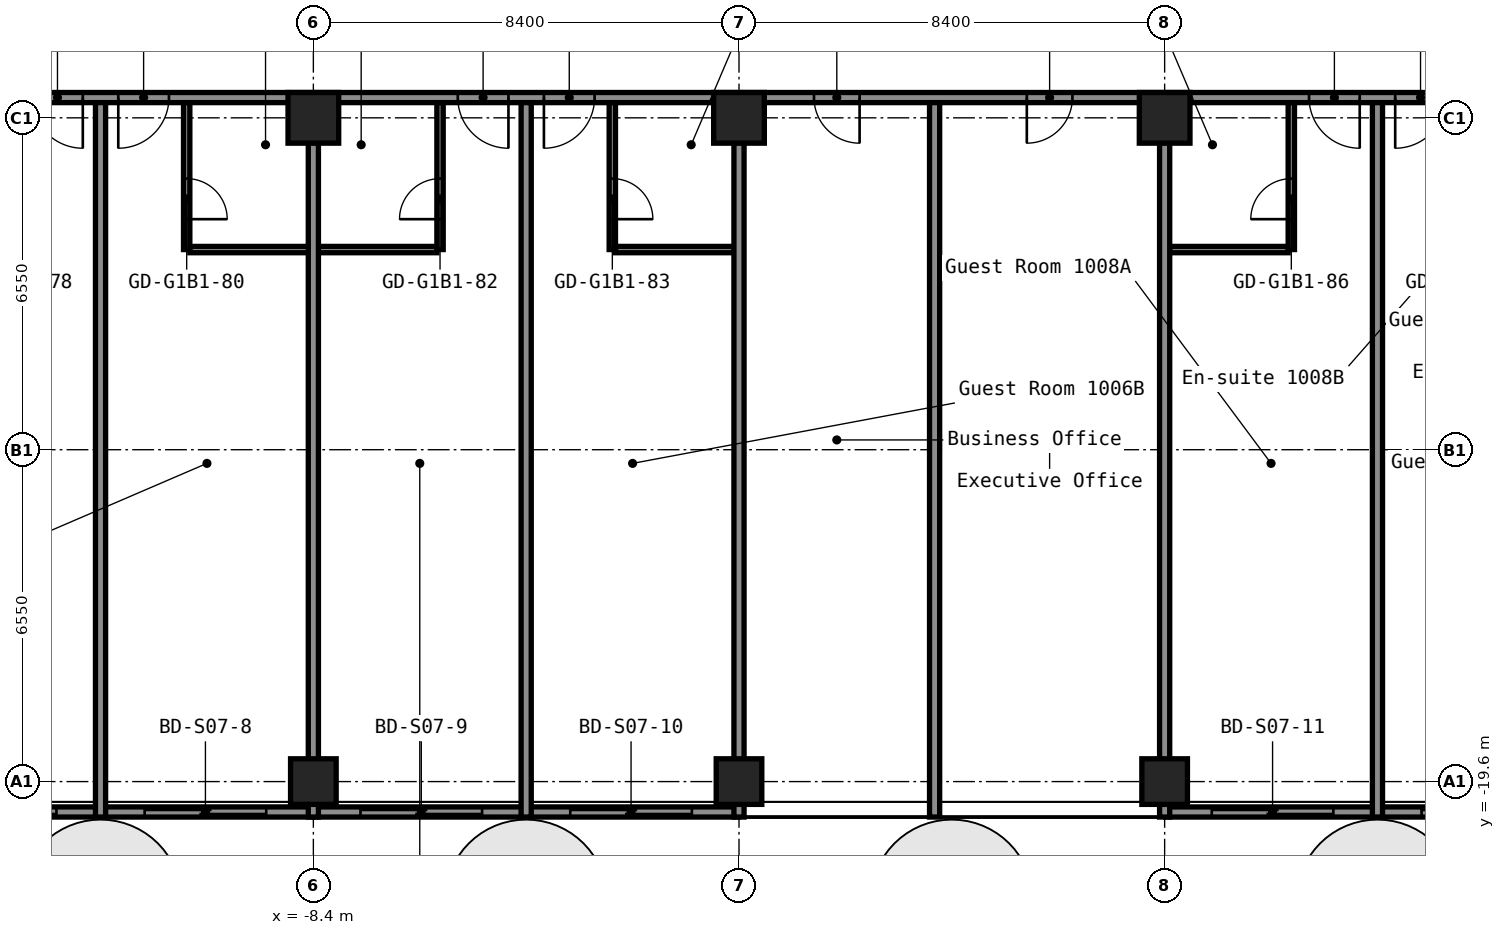
"""IFC4 building model, lengths in metres.
Left out: names, types, materials, properties, quantities, classifications, styles, units other than length and angle.
Written with IfcOpenShell. Run it as: python <this file> out.ifc"""

import sys

from ifc_helpers import new_model, si_unit, direction, frame, frame_2d, origin, origin_2d, place, context, subcontext, project, spatial, rectangle, hollow_rectangle, extrude, element, fill, save


model = new_model("IFC4")
c1 = context("Model", 3, precision=1e-05, world=origin(), true_north=direction((0.0, 1.0)))
c2 = subcontext(c1, "Body", "Model", "MODEL_VIEW")
j1 = project(units=[si_unit("LENGTHUNIT", "METRE"), si_unit("PLANEANGLEUNIT", "RADIAN")], contexts=[c1])
p1 = place(None, origin())
s1 = spatial("IfcSite", under=j1, at=p1, CompositionType="ELEMENT")
p2 = place(p1, origin())
s2 = spatial("IfcBuilding", under=s1, at=p2, CompositionType="ELEMENT")
p3 = place(p2, frame((0.0, 0.0, 39.0)))
s3 = spatial("IfcBuildingStorey", under=s2, at=p3, CompositionType="ELEMENT", Elevation=39.0)
p4 = place(p3, frame((-8.4, -19.6, 0.0), z_axis=(0.0, 0.0, 1.0), x_axis=(1.0, 0.0, 0.0)))
e1 = element("IfcColumn", 1, at=p4, inside=s3, PredefinedType="COLUMN", context=c2, shape_type="SweptSolid", body=[
    extrude(hollow_rectangle(XDim=0.9, YDim=0.9, WallThickness=0.036, at=origin_2d()), origin(), (0.0, 0.0, 1.0), 2.8),
])
p5 = place(p3, frame((-8.4, -6.5, 0.0), z_axis=(0.0, 0.0, 1.0), x_axis=(1.0, 0.0, 0.0)))
e2 = element("IfcColumn", 2, at=p5, inside=s3, PredefinedType="COLUMN", context=c2, shape_type="SweptSolid", body=[
    extrude(hollow_rectangle(XDim=1.0, YDim=1.0, WallThickness=0.04, at=origin_2d()), origin(), (0.0, 0.0, 1.0), 2.8),
])
p6 = place(p3, frame((0.0, -19.6, 0.0), z_axis=(0.0, 0.0, 1.0), x_axis=(1.0, 0.0, 0.0)))
e3 = element("IfcColumn", 3, at=p6, inside=s3, PredefinedType="COLUMN", context=c2, shape_type="SweptSolid", body=[
    extrude(hollow_rectangle(XDim=0.9, YDim=0.9, WallThickness=0.036, at=origin_2d()), origin(), (0.0, 0.0, 1.0), 2.8),
])
p7 = place(p3, frame((0.0, -6.5, 0.0), z_axis=(0.0, 0.0, 1.0), x_axis=(1.0, 0.0, 0.0)))
e4 = element("IfcColumn", 4, at=p7, inside=s3, PredefinedType="COLUMN", context=c2, shape_type="SweptSolid", body=[
    extrude(hollow_rectangle(XDim=1.0, YDim=1.0, WallThickness=0.04, at=origin_2d()), origin(), (0.0, 0.0, 1.0), 2.8),
])
p8 = place(p3, frame((8.4, -19.6, 0.0), z_axis=(0.0, 0.0, 1.0), x_axis=(1.0, 0.0, 0.0)))
e5 = element("IfcColumn", 5, at=p8, inside=s3, PredefinedType="COLUMN", context=c2, shape_type="SweptSolid", body=[
    extrude(hollow_rectangle(XDim=0.9, YDim=0.9, WallThickness=0.036, at=origin_2d()), origin(), (0.0, 0.0, 1.0), 2.8),
])
p9 = place(p3, frame((8.4, -6.5, 0.0), z_axis=(0.0, 0.0, 1.0), x_axis=(1.0, 0.0, 0.0)))
e6 = element("IfcColumn", 6, at=p9, inside=s3, PredefinedType="COLUMN", context=c2, shape_type="SweptSolid", body=[
    extrude(hollow_rectangle(XDim=1.0, YDim=1.0, WallThickness=0.04, at=origin_2d()), origin(), (0.0, 0.0, 1.0), 2.8),
])
p10 = place(p3, frame((-10.837, -9.1, 0.0), z_axis=(0.0, 0.0, 1.0), x_axis=(1.0, 0.0, 0.0)))
e7 = element("IfcWall", 7, at=p10, inside=s3, PredefinedType="PARTITIONING", context=c2, shape_type="SweptSolid", body=[
    extrude(rectangle(XDim=4.875, YDim=0.125, at=frame_2d((2.438, 0.0))), origin(), (0.0, 0.0, 1.0), 2.8),
])
for number, where, z_axis, x_axis in (
    (8, (-2.438, -9.1, 0.0), (0.0, 0.0, 1.0), (1.0, 0.0, 0.0)),
    (9, (8.5, -9.1, 0.0), (0.0, 0.0, 1.0), (1.0, 0.0, 0.0)),
):
    element("IfcWall", number, at=place(p3, frame(where, z_axis=z_axis, x_axis=x_axis)), inside=s3, PredefinedType="PARTITIONING", context=c2, shape_type="SweptSolid", body=[
        extrude(rectangle(XDim=2.337, YDim=0.125, at=frame_2d((1.169, 0.0))), origin(), (0.0, 0.0, 1.0), 2.8),
    ])
p11 = place(p3, frame((-16.8, -6.1, 0.0), z_axis=(0.0, 0.0, 1.0), x_axis=(1.0, 0.0, 0.0)))
e10 = element("IfcWall", 10, at=p11, inside=s3, PredefinedType="PARTITIONING", context=c2, shape_type="SweptSolid", body=[
    extrude(rectangle(XDim=33.6, YDim=0.2, at=frame_2d((16.8, 0.0))), origin(), (0.0, 0.0, 1.0), 2.8),
])
p12 = place(p11, frame((2.85, 0.0, 0.0)))
e11 = element("IfcOpeningElement", 11, at=p12, cuts=e10, PredefinedType="OPENING", context=c2, shape_type="SweptSolid", body=[
    extrude(rectangle(XDim=1.0, YDim=2.1, at=frame_2d((0.5, 1.05))), frame((0.0, 0.11, 0.0), z_axis=(0.0, -1.0, 0.0), x_axis=(1.0, 0.0, 0.0)), (0.0, 0.0, 1.0), 0.22),
])
p13 = place(p11, frame((4.55, 0.0, 0.0)))
e12 = element("IfcOpeningElement", 12, at=p13, cuts=e10, PredefinedType="OPENING", context=c2, shape_type="SweptSolid", body=[
    extrude(rectangle(XDim=1.0, YDim=2.1, at=frame_2d((0.5, 1.05))), frame((0.0, 0.11, 0.0), z_axis=(0.0, -1.0, 0.0), x_axis=(1.0, 0.0, 0.0)), (0.0, 0.0, 1.0), 0.22),
])
p14 = place(p11, frame((11.25, 0.0, 0.0)))
e13 = element("IfcOpeningElement", 13, at=p14, cuts=e10, PredefinedType="OPENING", context=c2, shape_type="SweptSolid", body=[
    extrude(rectangle(XDim=1.0, YDim=2.1, at=frame_2d((0.5, 1.05))), frame((0.0, 0.11, 0.0), z_axis=(0.0, -1.0, 0.0), x_axis=(1.0, 0.0, 0.0)), (0.0, 0.0, 1.0), 0.22),
])
p15 = place(p11, frame((12.95, 0.0, 0.0)))
e14 = element("IfcOpeningElement", 14, at=p15, cuts=e10, PredefinedType="OPENING", context=c2, shape_type="SweptSolid", body=[
    extrude(rectangle(XDim=1.0, YDim=2.1, at=frame_2d((0.5, 1.05))), frame((0.0, 0.11, 0.0), z_axis=(0.0, -1.0, 0.0), x_axis=(1.0, 0.0, 0.0)), (0.0, 0.0, 1.0), 0.22),
])
p16 = place(p11, frame((18.28, 0.0, 0.0)))
e15 = element("IfcOpeningElement", 15, at=p16, cuts=e10, PredefinedType="OPENING", context=c2, shape_type="SweptSolid", body=[
    extrude(rectangle(XDim=0.9, YDim=2.1, at=frame_2d((0.45, 1.05))), frame((0.0, 0.11, 0.0), z_axis=(0.0, -1.0, 0.0), x_axis=(1.0, 0.0, 0.0)), (0.0, 0.0, 1.0), 0.22),
])
p17 = place(p11, frame((22.48, 0.0, 0.0)))
e16 = element("IfcOpeningElement", 16, at=p17, cuts=e10, PredefinedType="OPENING", context=c2, shape_type="SweptSolid", body=[
    extrude(rectangle(XDim=0.9, YDim=2.1, at=frame_2d((0.45, 1.05))), frame((0.0, 0.11, 0.0), z_axis=(0.0, -1.0, 0.0), x_axis=(1.0, 0.0, 0.0)), (0.0, 0.0, 1.0), 0.22),
])
p18 = place(p11, frame((28.05, 0.0, 0.0)))
e17 = element("IfcOpeningElement", 17, at=p18, cuts=e10, PredefinedType="OPENING", context=c2, shape_type="SweptSolid", body=[
    extrude(rectangle(XDim=1.0, YDim=2.1, at=frame_2d((0.5, 1.05))), frame((0.0, 0.11, 0.0), z_axis=(0.0, -1.0, 0.0), x_axis=(1.0, 0.0, 0.0)), (0.0, 0.0, 1.0), 0.22),
])
p19 = place(p11, frame((29.75, 0.0, 0.0)))
e18 = element("IfcOpeningElement", 18, at=p19, cuts=e10, PredefinedType="OPENING", context=c2, shape_type="SweptSolid", body=[
    extrude(rectangle(XDim=1.0, YDim=2.1, at=frame_2d((0.5, 1.05))), frame((0.0, 0.11, 0.0), z_axis=(0.0, -1.0, 0.0), x_axis=(1.0, 0.0, 0.0)), (0.0, 0.0, 1.0), 0.22),
])
p20 = place(p3, frame((-12.6, -20.3, 0.0), z_axis=(0.0, 0.0, 1.0), x_axis=(0.0, 1.0, 0.0)))
e19 = element("IfcWall", 19, at=p20, inside=s3, PredefinedType="PARTITIONING", context=c2, shape_type="SweptSolid", body=[
    extrude(rectangle(XDim=14.1, YDim=0.2, at=frame_2d((7.05, 0.0))), origin(), (0.0, 0.0, 1.0), 2.8),
])
p21 = place(p3, frame((-10.9, -9.1, 0.0), z_axis=(0.0, 0.0, 1.0), x_axis=(0.0, 1.0, 0.0)))
e20 = element("IfcWall", 20, at=p21, inside=s3, PredefinedType="PARTITIONING", context=c2, shape_type="SweptSolid", body=[
    extrude(rectangle(XDim=2.9, YDim=0.125, at=frame_2d((1.45, 0.0))), origin(), (0.0, 0.0, 1.0), 2.8),
])
p22 = place(p21, frame((0.6, 0.0, 0.0)))
e21 = element("IfcOpeningElement", 21, at=p22, cuts=e20, PredefinedType="OPENING", context=c2, shape_type="SweptSolid", body=[
    extrude(rectangle(XDim=0.8, YDim=2.1, at=frame_2d((0.4, 1.05))), frame((0.0, 0.073, 0.0), z_axis=(0.0, -1.0, 0.0), x_axis=(1.0, 0.0, 0.0)), (0.0, 0.0, 1.0), 0.145),
])
p23 = place(p3, frame((-8.4, -20.3, 0.0), z_axis=(0.0, 0.0, 1.0), x_axis=(0.0, 1.0, 0.0)))
e22 = element("IfcWall", 22, at=p23, inside=s3, PredefinedType="PARTITIONING", context=c2, shape_type="SweptSolid", body=[
    extrude(rectangle(XDim=13.31, YDim=0.2, at=frame_2d((6.655, 0.0))), origin(), (0.0, 0.0, 1.0), 2.8),
])
p24 = place(p3, frame((-5.9, -9.1, 0.0), z_axis=(0.0, 0.0, 1.0), x_axis=(0.0, 1.0, 0.0)))
e23 = element("IfcWall", 23, at=p24, inside=s3, PredefinedType="PARTITIONING", context=c2, shape_type="SweptSolid", body=[
    extrude(rectangle(XDim=2.9, YDim=0.125, at=frame_2d((1.45, 0.0))), origin(), (0.0, 0.0, 1.0), 2.8),
])
p25 = place(p24, frame((0.6, 0.0, 0.0)))
e24 = element("IfcOpeningElement", 24, at=p25, cuts=e23, PredefinedType="OPENING", context=c2, shape_type="SweptSolid", body=[
    extrude(rectangle(XDim=0.8, YDim=2.1, at=frame_2d((0.4, 1.05))), frame((0.0, 0.073, 0.0), z_axis=(0.0, -1.0, 0.0), x_axis=(1.0, 0.0, 0.0)), (0.0, 0.0, 1.0), 0.145),
])
p26 = place(p3, frame((-4.2, -20.3, 0.0), z_axis=(0.0, 0.0, 1.0), x_axis=(0.0, 1.0, 0.0)))
e25 = element("IfcWall", 25, at=p26, inside=s3, PredefinedType="PARTITIONING", context=c2, shape_type="SweptSolid", body=[
    extrude(rectangle(XDim=14.1, YDim=0.2, at=frame_2d((7.05, 0.0))), origin(), (0.0, 0.0, 1.0), 2.8),
])
p27 = place(p3, frame((-2.5, -9.1, 0.0), z_axis=(0.0, 0.0, 1.0), x_axis=(0.0, 1.0, 0.0)))
e26 = element("IfcWall", 26, at=p27, inside=s3, PredefinedType="PARTITIONING", context=c2, shape_type="SweptSolid", body=[
    extrude(rectangle(XDim=2.9, YDim=0.125, at=frame_2d((1.45, 0.0))), origin(), (0.0, 0.0, 1.0), 2.8),
])
p28 = place(p27, frame((0.6, 0.0, 0.0)))
e27 = element("IfcOpeningElement", 27, at=p28, cuts=e26, PredefinedType="OPENING", context=c2, shape_type="SweptSolid", body=[
    extrude(rectangle(XDim=0.8, YDim=2.1, at=frame_2d((0.4, 1.05))), frame((0.0, 0.073, 0.0), z_axis=(0.0, -1.0, 0.0), x_axis=(1.0, 0.0, 0.0)), (0.0, 0.0, 1.0), 0.145),
])
p29 = place(p3, frame((0.0, -20.3, 0.0), z_axis=(0.0, 0.0, 1.0), x_axis=(0.0, 1.0, 0.0)))
e28 = element("IfcWall", 28, at=p29, inside=s3, PredefinedType="PARTITIONING", context=c2, shape_type="SweptSolid", body=[
    extrude(rectangle(XDim=13.31, YDim=0.2, at=frame_2d((6.655, 0.0))), origin(), (0.0, 0.0, 1.0), 2.8),
])
p30 = place(p3, frame((3.86, -20.3, 0.0), z_axis=(0.0, 0.0, 1.0), x_axis=(0.0, 1.0, 0.0)))
e29 = element("IfcWall", 29, at=p30, inside=s3, PredefinedType="PARTITIONING", context=c2, shape_type="SweptSolid", body=[
    extrude(rectangle(XDim=14.1, YDim=0.2, at=frame_2d((7.05, 0.0))), origin(), (0.0, 0.0, 1.0), 2.8),
])
p31 = place(p3, frame((8.4, -20.3, 0.0), z_axis=(0.0, 0.0, 1.0), x_axis=(0.0, 1.0, 0.0)))
e30 = element("IfcWall", 30, at=p31, inside=s3, PredefinedType="PARTITIONING", context=c2, shape_type="SweptSolid", body=[
    extrude(rectangle(XDim=13.31, YDim=0.2, at=frame_2d((6.655, 0.0))), origin(), (0.0, 0.0, 1.0), 2.8),
])
p32 = place(p3, frame((10.9, -9.1, 0.0), z_axis=(0.0, 0.0, 1.0), x_axis=(0.0, 1.0, 0.0)))
e31 = element("IfcWall", 31, at=p32, inside=s3, PredefinedType="PARTITIONING", context=c2, shape_type="SweptSolid", body=[
    extrude(rectangle(XDim=2.9, YDim=0.125, at=frame_2d((1.45, 0.0))), origin(), (0.0, 0.0, 1.0), 2.8),
])
p33 = place(p32, frame((0.6, 0.0, 0.0)))
e32 = element("IfcOpeningElement", 32, at=p33, cuts=e31, PredefinedType="OPENING", context=c2, shape_type="SweptSolid", body=[
    extrude(rectangle(XDim=0.8, YDim=2.1, at=frame_2d((0.4, 1.05))), frame((0.0, 0.073, 0.0), z_axis=(0.0, -1.0, 0.0), x_axis=(1.0, 0.0, 0.0)), (0.0, 0.0, 1.0), 0.145),
])
p34 = place(p3, frame((12.6, -20.3, 0.0), z_axis=(0.0, 0.0, 1.0), x_axis=(0.0, 1.0, 0.0)))
e33 = element("IfcWall", 33, at=p34, inside=s3, PredefinedType="PARTITIONING", context=c2, shape_type="SweptSolid", body=[
    extrude(rectangle(XDim=14.1, YDim=0.2, at=frame_2d((7.05, 0.0))), origin(), (0.0, 0.0, 1.0), 2.8),
])
p35 = place(p3, frame((-16.78, -20.2, 0.0), z_axis=(0.0, 0.0, 1.0), x_axis=(1.0, 0.0, 0.0)))
p36 = place(p35, frame((0.91, 0.0, 0.0)))
p37 = place(p36, frame((2.4, 0.0, 0.0), z_axis=(0.0, 0.0, 1.0), x_axis=(-1.0, 0.0, 0.0)))
e34 = element("IfcDoor", 34, at=p37, inside=s3, OperationType="SLIDING_TO_LEFT", PredefinedType="DOOR", context=c2, shape_type="SweptSolid", body=[
    extrude(rectangle(XDim=2.4, YDim=2.2, at=frame_2d((1.2, 1.1))), frame((0.0, 0.025, 0.0), z_axis=(0.0, -1.0, 0.0), x_axis=(1.0, 0.0, 0.0)), (0.0, 0.0, 1.0), 0.05),
])
p38 = place(p3, frame((-12.64, -20.2, 0.0), z_axis=(0.0, 0.0, 1.0), x_axis=(1.0, 0.0, 0.0)))
p39 = place(p38, frame((0.91, 0.0, 0.0)))
p40 = place(p39, frame((2.4, 0.0, 0.0), z_axis=(0.0, 0.0, 1.0), x_axis=(-1.0, 0.0, 0.0)))
e35 = element("IfcDoor", 35, at=p40, inside=s3, OperationType="SLIDING_TO_LEFT", PredefinedType="DOOR", context=c2, shape_type="SweptSolid", body=[
    extrude(rectangle(XDim=2.4, YDim=2.2, at=frame_2d((1.2, 1.1))), frame((0.0, 0.025, 0.0), z_axis=(0.0, -1.0, 0.0), x_axis=(1.0, 0.0, 0.0)), (0.0, 0.0, 1.0), 0.05),
])
p41 = place(p3, frame((-8.38, -20.2, 0.0), z_axis=(0.0, 0.0, 1.0), x_axis=(1.0, 0.0, 0.0)))
p42 = place(p41, frame((0.91, 0.0, 0.0)))
p43 = place(p42, frame((2.4, 0.0, 0.0), z_axis=(0.0, 0.0, 1.0), x_axis=(-1.0, 0.0, 0.0)))
e36 = element("IfcDoor", 36, at=p43, inside=s3, OperationType="SLIDING_TO_LEFT", PredefinedType="DOOR", context=c2, shape_type="SweptSolid", body=[
    extrude(rectangle(XDim=2.4, YDim=2.2, at=frame_2d((1.2, 1.1))), frame((0.0, 0.025, 0.0), z_axis=(0.0, -1.0, 0.0), x_axis=(1.0, 0.0, 0.0)), (0.0, 0.0, 1.0), 0.05),
])
p44 = place(p3, frame((-4.24, -20.2, 0.0), z_axis=(0.0, 0.0, 1.0), x_axis=(1.0, 0.0, 0.0)))
p45 = place(p44, frame((0.91, 0.0, 0.0)))
p46 = place(p45, frame((2.4, 0.0, 0.0), z_axis=(0.0, 0.0, 1.0), x_axis=(-1.0, 0.0, 0.0)))
e37 = element("IfcDoor", 37, at=p46, inside=s3, OperationType="SLIDING_TO_LEFT", PredefinedType="DOOR", context=c2, shape_type="SweptSolid", body=[
    extrude(rectangle(XDim=2.4, YDim=2.2, at=frame_2d((1.2, 1.1))), frame((0.0, 0.025, 0.0), z_axis=(0.0, -1.0, 0.0), x_axis=(1.0, 0.0, 0.0)), (0.0, 0.0, 1.0), 0.05),
])
p47 = place(p3, frame((8.42, -20.2, 0.0), z_axis=(0.0, 0.0, 1.0), x_axis=(1.0, 0.0, 0.0)))
p48 = place(p47, frame((0.91, 0.0, 0.0)))
p49 = place(p48, frame((2.4, 0.0, 0.0), z_axis=(0.0, 0.0, 1.0), x_axis=(-1.0, 0.0, 0.0)))
e38 = element("IfcDoor", 38, at=p49, inside=s3, OperationType="SLIDING_TO_LEFT", PredefinedType="DOOR", context=c2, shape_type="SweptSolid", body=[
    extrude(rectangle(XDim=2.4, YDim=2.2, at=frame_2d((1.2, 1.1))), frame((0.0, 0.025, 0.0), z_axis=(0.0, -1.0, 0.0), x_axis=(1.0, 0.0, 0.0)), (0.0, 0.0, 1.0), 0.05),
])
p50 = place(p3, frame((12.56, -20.2, 0.0), z_axis=(0.0, 0.0, 1.0), x_axis=(1.0, 0.0, 0.0)))
p51 = place(p50, frame((0.91, 0.0, 0.0)))
p52 = place(p51, frame((2.4, 0.0, 0.0), z_axis=(0.0, 0.0, 1.0), x_axis=(-1.0, 0.0, 0.0)))
e39 = element("IfcDoor", 39, at=p52, inside=s3, OperationType="SLIDING_TO_LEFT", PredefinedType="DOOR", context=c2, shape_type="SweptSolid", body=[
    extrude(rectangle(XDim=2.4, YDim=2.2, at=frame_2d((1.2, 1.1))), frame((0.0, 0.025, 0.0), z_axis=(0.0, -1.0, 0.0), x_axis=(1.0, 0.0, 0.0)), (0.0, 0.0, 1.0), 0.05),
])
p53 = place(p12, origin())
e40 = element("IfcDoor", 40, at=p53, inside=s3, OperationType="SINGLE_SWING_RIGHT", PredefinedType="DOOR", context=c2, shape_type="SweptSolid", body=[
    extrude(rectangle(XDim=1.0, YDim=2.1, at=frame_2d((0.5, 1.05))), frame((0.0, 0.025, 0.0), z_axis=(0.0, -1.0, 0.0), x_axis=(1.0, 0.0, 0.0)), (0.0, 0.0, 1.0), 0.05),
])
fill(e11, e40)
p54 = place(p13, origin())
e41 = element("IfcDoor", 41, at=p54, inside=s3, OperationType="SINGLE_SWING_LEFT", PredefinedType="DOOR", context=c2, shape_type="SweptSolid", body=[
    extrude(rectangle(XDim=1.0, YDim=2.1, at=frame_2d((0.5, 1.05))), frame((0.0, 0.025, 0.0), z_axis=(0.0, -1.0, 0.0), x_axis=(1.0, 0.0, 0.0)), (0.0, 0.0, 1.0), 0.05),
])
fill(e12, e41)
p55 = place(p14, origin())
e42 = element("IfcDoor", 42, at=p55, inside=s3, OperationType="SINGLE_SWING_RIGHT", PredefinedType="DOOR", context=c2, shape_type="SweptSolid", body=[
    extrude(rectangle(XDim=1.0, YDim=2.1, at=frame_2d((0.5, 1.05))), frame((0.0, 0.025, 0.0), z_axis=(0.0, -1.0, 0.0), x_axis=(1.0, 0.0, 0.0)), (0.0, 0.0, 1.0), 0.05),
])
fill(e13, e42)
p56 = place(p15, origin())
e43 = element("IfcDoor", 43, at=p56, inside=s3, OperationType="SINGLE_SWING_LEFT", PredefinedType="DOOR", context=c2, shape_type="SweptSolid", body=[
    extrude(rectangle(XDim=1.0, YDim=2.1, at=frame_2d((0.5, 1.05))), frame((0.0, 0.025, 0.0), z_axis=(0.0, -1.0, 0.0), x_axis=(1.0, 0.0, 0.0)), (0.0, 0.0, 1.0), 0.05),
])
fill(e14, e43)
p57 = place(p16, origin())
e44 = element("IfcDoor", 44, at=p57, inside=s3, OperationType="SINGLE_SWING_RIGHT", PredefinedType="DOOR", context=c2, shape_type="SweptSolid", body=[
    extrude(rectangle(XDim=0.9, YDim=2.1, at=frame_2d((0.45, 1.05))), frame((0.0, 0.025, 0.0), z_axis=(0.0, -1.0, 0.0), x_axis=(1.0, 0.0, 0.0)), (0.0, 0.0, 1.0), 0.05),
])
fill(e15, e44)
p58 = place(p17, origin())
e45 = element("IfcDoor", 45, at=p58, inside=s3, OperationType="SINGLE_SWING_LEFT", PredefinedType="DOOR", context=c2, shape_type="SweptSolid", body=[
    extrude(rectangle(XDim=0.9, YDim=2.1, at=frame_2d((0.45, 1.05))), frame((0.0, 0.025, 0.0), z_axis=(0.0, -1.0, 0.0), x_axis=(1.0, 0.0, 0.0)), (0.0, 0.0, 1.0), 0.05),
])
fill(e16, e45)
p59 = place(p18, origin())
e46 = element("IfcDoor", 46, at=p59, inside=s3, OperationType="SINGLE_SWING_RIGHT", PredefinedType="DOOR", context=c2, shape_type="SweptSolid", body=[
    extrude(rectangle(XDim=1.0, YDim=2.1, at=frame_2d((0.5, 1.05))), frame((0.0, 0.025, 0.0), z_axis=(0.0, -1.0, 0.0), x_axis=(1.0, 0.0, 0.0)), (0.0, 0.0, 1.0), 0.05),
])
fill(e17, e46)
p60 = place(p19, origin())
e47 = element("IfcDoor", 47, at=p60, inside=s3, OperationType="SINGLE_SWING_LEFT", PredefinedType="DOOR", context=c2, shape_type="SweptSolid", body=[
    extrude(rectangle(XDim=1.0, YDim=2.1, at=frame_2d((0.5, 1.05))), frame((0.0, 0.025, 0.0), z_axis=(0.0, -1.0, 0.0), x_axis=(1.0, 0.0, 0.0)), (0.0, 0.0, 1.0), 0.05),
])
fill(e18, e47)
p61 = place(p22, origin())
e48 = element("IfcDoor", 48, at=p61, inside=s3, OperationType="SINGLE_SWING_LEFT", PredefinedType="DOOR", context=c2, shape_type="SweptSolid", body=[
    extrude(rectangle(XDim=0.8, YDim=2.1, at=frame_2d((0.4, 1.05))), frame((0.0, 0.025, 0.0), z_axis=(0.0, -1.0, 0.0), x_axis=(1.0, 0.0, 0.0)), (0.0, 0.0, 1.0), 0.05),
])
fill(e21, e48)
p62 = place(p25, origin())
e49 = element("IfcDoor", 49, at=p62, inside=s3, OperationType="SINGLE_SWING_RIGHT", PredefinedType="DOOR", context=c2, shape_type="SweptSolid", body=[
    extrude(rectangle(XDim=0.8, YDim=2.1, at=frame_2d((0.4, 1.05))), frame((0.0, 0.025, 0.0), z_axis=(0.0, -1.0, 0.0), x_axis=(1.0, 0.0, 0.0)), (0.0, 0.0, 1.0), 0.05),
])
fill(e24, e49)
p63 = place(p28, origin())
e50 = element("IfcDoor", 50, at=p63, inside=s3, OperationType="SINGLE_SWING_LEFT", PredefinedType="DOOR", context=c2, shape_type="SweptSolid", body=[
    extrude(rectangle(XDim=0.8, YDim=2.1, at=frame_2d((0.4, 1.05))), frame((0.0, 0.025, 0.0), z_axis=(0.0, -1.0, 0.0), x_axis=(1.0, 0.0, 0.0)), (0.0, 0.0, 1.0), 0.05),
])
fill(e27, e50)
p64 = place(p33, origin())
e51 = element("IfcDoor", 51, at=p64, inside=s3, OperationType="SINGLE_SWING_RIGHT", PredefinedType="DOOR", context=c2, shape_type="SweptSolid", body=[
    extrude(rectangle(XDim=0.8, YDim=2.1, at=frame_2d((0.4, 1.05))), frame((0.0, 0.025, 0.0), z_axis=(0.0, -1.0, 0.0), x_axis=(1.0, 0.0, 0.0)), (0.0, 0.0, 1.0), 0.05),
])
fill(e32, e51)
save(model, sys.argv[1])
